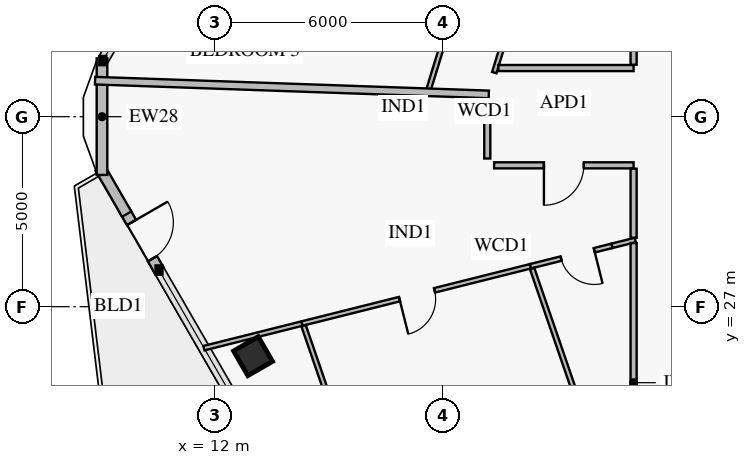
"""IFC4 building model, lengths in metres.
Left out: names, types, materials, properties, quantities, classifications, styles, units other than length and angle.
Written with IfcOpenShell. Run it as: python <this file> out.ifc"""

import sys

from ifc_helpers import new_model, si_unit, direction, frame, frame_2d, origin, origin_2d, place, context, subcontext, project, spatial, rectangle, extrude, element, fill, save


model = new_model("IFC4")
c1 = context("Model", 3, precision=1e-05, world=origin(), true_north=direction((0.0, 1.0)))
c2 = subcontext(c1, "Body", "Model", "MODEL_VIEW")
j1 = project(units=[si_unit("LENGTHUNIT", "METRE"), si_unit("PLANEANGLEUNIT", "RADIAN")], contexts=[c1])
p1 = place(None, origin())
s1 = spatial("IfcSite", under=j1, at=p1, CompositionType="ELEMENT")
p2 = place(p1, origin())
s2 = spatial("IfcBuilding", under=s1, at=p2, CompositionType="ELEMENT")
p3 = place(p2, frame((0.0, 0.0, 342.4)))
s3 = spatial("IfcBuildingStorey", under=s2, at=p3, CompositionType="ELEMENT", Elevation=342.4)
p4 = place(p3, frame((13.007, 25.698, 0.0), z_axis=(0.0, 0.0, 1.0), x_axis=(0.5, -0.866025403784, 0.0)))
e1 = element("IfcColumn", 1, at=p4, inside=s3, PredefinedType="COLUMN", context=c2, shape_type="SweptSolid", body=[
    extrude(rectangle(XDim=0.75, YDim=0.75, at=origin_2d()), origin(), (0.0, 0.0, 1.0), 3.55),
])
p5 = place(p3, frame((10.531, 27.965, 0.0), z_axis=(0.0, 0.0, 1.0), x_axis=(-0.499982180423, 0.866035691677, 0.0)))
e2 = element("IfcWall", 2, at=p5, inside=s3, PredefinedType="SOLIDWALL", context=c2, shape_type="SweptSolid", body=[
    extrude(rectangle(XDim=1.79, YDim=0.28, at=frame_2d((0.895, 0.0))), origin(), (0.0, 0.0, 1.0), 3.55),
])
p6 = place(p5, frame((0.345, 0.0, 0.0)))
e3 = element("IfcOpeningElement", 3, at=p6, cuts=e2, PredefinedType="OPENING", context=c2, shape_type="SweptSolid", body=[
    extrude(rectangle(XDim=1.1, YDim=2.2, at=frame_2d((0.55, 1.1))), frame((0.0, 0.152, 0.0), z_axis=(0.0, -1.0, 0.0), x_axis=(1.0, 0.0, 0.0)), (0.0, 0.0, 1.0), 0.304),
])
p7 = place(p3, frame((9.681, 29.437, 0.0), z_axis=(0.0, 0.0, 1.0), x_axis=(-0.499980071345, 0.866036909293, 0.0)))
e4 = element("IfcWall", 4, at=p7, inside=s3, PredefinedType="SOLIDWALL", context=c2, shape_type="SweptSolid", body=[
    extrude(rectangle(XDim=1.395, YDim=0.28, at=frame_2d((0.697, 0.0))), origin(), (0.0, 0.0, 1.0), 3.122),
])
p8 = place(p3, frame((9.031, 30.468, 0.0), z_axis=(0.0, 0.0, 1.0), x_axis=(0.0, 1.0, 0.0)))
e5 = element("IfcWall", 5, at=p8, inside=s3, PredefinedType="SOLIDWALL", context=c2, shape_type="SweptSolid", body=[
    extrude(rectangle(XDim=3.065, YDim=0.28, at=frame_2d((1.532, 0.0))), origin(), (0.0, 0.0, 1.0), 3.55),
])
p9 = place(p3, frame((21.748, 40.934, 0.0), z_axis=(0.0, 0.0, 1.0), x_axis=(-0.294353697783, -0.955696552574, 0.0)))
e6 = element("IfcWall", 6, at=p9, inside=s3, PredefinedType="PARTITIONING", context=c2, shape_type="SweptSolid", body=[
    extrude(rectangle(XDim=8.134, YDim=0.12, at=frame_2d((4.067, 0.0))), origin(), (0.0, 0.0, 1.0), 3.0),
])
p10 = place(p9, frame((2.246, 0.0, 0.0)))
e7 = element("IfcOpeningElement", 7, at=p10, cuts=e6, PredefinedType="OPENING", context=c2, shape_type="SweptSolid", body=[
    extrude(rectangle(XDim=0.95, YDim=2.1, at=frame_2d((0.475, 1.05))), frame((0.0, 0.072, 0.0), z_axis=(0.0, -1.0, 0.0), x_axis=(1.0, 0.0, 0.0)), (0.0, 0.0, 1.0), 0.144),
])
p11 = place(p9, frame((6.234, 0.0, 0.0)))
e8 = element("IfcOpeningElement", 8, at=p11, cuts=e6, PredefinedType="OPENING", context=c2, shape_type="SweptSolid", body=[
    extrude(rectangle(XDim=0.9, YDim=2.1, at=frame_2d((0.45, 1.05))), frame((0.0, 0.072, 0.0), z_axis=(0.0, -1.0, 0.0), x_axis=(1.0, 0.0, 0.0)), (0.0, 0.0, 1.0), 0.144),
])
p12 = place(p3, frame((20.412, 41.76, 0.0), z_axis=(0.0, 0.0, 1.0), x_axis=(-0.294382698644, -0.955687619853, 0.0)))
e9 = element("IfcWall", 9, at=p12, inside=s3, PredefinedType="PARTITIONING", context=c2, shape_type="SweptSolid", body=[
    extrude(rectangle(XDim=9.478, YDim=0.12, at=frame_2d((4.739, 0.0))), origin(), (0.0, 0.0, 1.0), 3.0),
])
p13 = place(p12, frame((1.187, 0.0, 0.0)))
e10 = element("IfcOpeningElement", 10, at=p13, cuts=e9, PredefinedType="OPENING", context=c2, shape_type="SweptSolid", body=[
    extrude(rectangle(XDim=0.95, YDim=2.1, at=frame_2d((0.475, 1.05))), frame((0.0, 0.072, 0.0), z_axis=(0.0, -1.0, 0.0), x_axis=(1.0, 0.0, 0.0)), (0.0, 0.0, 1.0), 0.144),
])
p14 = place(p12, frame((4.264, 0.0, 0.0)))
e11 = element("IfcOpeningElement", 11, at=p14, cuts=e9, PredefinedType="OPENING", context=c2, shape_type="SweptSolid", body=[
    extrude(rectangle(XDim=0.95, YDim=2.1, at=frame_2d((0.475, 1.05))), frame((0.0, 0.072, 0.0), z_axis=(0.0, -1.0, 0.0), x_axis=(1.0, 0.0, 0.0)), (0.0, 0.0, 1.0), 0.144),
])
p15 = place(p12, frame((7.341, 0.0, 0.0)))
e12 = element("IfcOpeningElement", 12, at=p15, cuts=e9, PredefinedType="OPENING", context=c2, shape_type="SweptSolid", body=[
    extrude(rectangle(XDim=0.95, YDim=2.1, at=frame_2d((0.475, 1.05))), frame((0.0, 0.072, 0.0), z_axis=(0.0, -1.0, 0.0), x_axis=(1.0, 0.0, 0.0)), (0.0, 0.0, 1.0), 0.144),
])
p16 = place(p3, frame((22.45, 28.602, 0.0), z_axis=(0.0, 0.0, 1.0), x_axis=(-0.969941016034, -0.243340143452, 0.0)))
e13 = element("IfcWall", 13, at=p16, inside=s3, PredefinedType="PARTITIONING", context=c2, shape_type="SweptSolid", body=[
    extrude(rectangle(XDim=2.213, YDim=0.12, at=frame_2d((1.106, 0.0))), origin(), (0.0, 0.0, 1.0), 3.55),
])
p17 = place(p16, frame((0.479, 0.0, 0.0)))
e14 = element("IfcOpeningElement", 14, at=p17, cuts=e13, PredefinedType="OPENING", context=c2, shape_type="SweptSolid", body=[
    extrude(rectangle(XDim=0.9, YDim=2.1, at=frame_2d((0.45, 1.05))), frame((0.0, 0.072, 0.0), z_axis=(0.0, -1.0, 0.0), x_axis=(1.0, 0.0, 0.0)), (0.0, 0.0, 1.0), 0.144),
])
p18 = place(p3, frame((20.303, 28.063, 0.0), z_axis=(0.0, 0.0, 1.0), x_axis=(-0.969954547898, -0.243286199796, 0.0)))
e15 = element("IfcWall", 15, at=p18, inside=s3, PredefinedType="PARTITIONING", context=c2, shape_type="SweptSolid", body=[
    extrude(rectangle(XDim=6.199, YDim=0.12, at=frame_2d((3.099, 0.0))), origin(), (0.0, 0.0, 1.0), 3.55),
])
p19 = place(p18, frame((2.599, 0.0, 0.0)))
e16 = element("IfcOpeningElement", 16, at=p19, cuts=e15, PredefinedType="OPENING", context=c2, shape_type="SweptSolid", body=[
    extrude(rectangle(XDim=0.95, YDim=2.1, at=frame_2d((0.475, 1.05))), frame((0.0, 0.072, 0.0), z_axis=(0.0, -1.0, 0.0), x_axis=(1.0, 0.0, 0.0)), (0.0, 0.0, 1.0), 0.144),
])
p20 = place(p3, frame((14.337, 26.497, 0.0), z_axis=(0.0, 0.0, 1.0), x_axis=(0.325570697436, -0.945517699978, 0.0)))
e17 = element("IfcWall", 17, at=p20, inside=s3, PredefinedType="PARTITIONING", context=c2, shape_type="SweptSolid", body=[
    extrude(rectangle(XDim=10.284, YDim=0.12, at=frame_2d((5.142, 0.0))), origin(), (0.0, 0.0, 1.0), 2.97),
])
p21 = place(p20, frame((4.583, 0.0, 0.0)))
e18 = element("IfcOpeningElement", 18, at=p21, cuts=e17, PredefinedType="OPENING", context=c2, shape_type="SweptSolid", body=[
    extrude(rectangle(XDim=0.95, YDim=2.1, at=frame_2d((0.475, 1.05))), frame((0.0, 0.072, 0.0), z_axis=(0.0, -1.0, 0.0), x_axis=(1.0, 0.0, 0.0)), (0.0, 0.0, 1.0), 0.144),
])
p22 = place(p3, frame((19.35, 30.72, 0.0), z_axis=(0.0, 0.0, 1.0), x_axis=(1.0, 0.0, 0.0)))
e19 = element("IfcWall", 19, at=p22, inside=s3, PredefinedType="PARTITIONING", context=c2, shape_type="SweptSolid", body=[
    extrude(rectangle(XDim=3.67, YDim=0.16, at=frame_2d((1.835, 0.0))), origin(), (0.0, 0.0, 1.0), 3.55),
])
p23 = place(p22, frame((1.31, 0.0, 0.0)))
e20 = element("IfcOpeningElement", 20, at=p23, cuts=e19, PredefinedType="OPENING", context=c2, shape_type="SweptSolid", body=[
    extrude(rectangle(XDim=1.05, YDim=2.15, at=frame_2d((0.525, 1.075))), frame((0.0, 0.092, 0.0), z_axis=(0.0, -1.0, 0.0), x_axis=(1.0, 0.0, 0.0)), (0.0, 0.0, 1.0), 0.184),
])
p24 = place(p3, frame((19.21, 32.586, 0.0), z_axis=(0.0, 0.0, 1.0), x_axis=(-0.999390829102, 0.034899437044, 0.0)))
e21 = element("IfcWall", 21, at=p24, inside=s3, PredefinedType="PARTITIONING", context=c2, shape_type="SweptSolid", body=[
    extrude(rectangle(XDim=10.367, YDim=0.2, at=frame_2d((5.184, 0.0))), origin(), (0.0, 0.0, 1.0), 2.97),
])
p25 = place(p3, frame((23.064, 28.756, 0.0), z_axis=(0.0, 0.0, 1.0), x_axis=(-0.969960808965, -0.243261236271, 0.0)))
e22 = element("IfcWall", 22, at=p25, inside=s3, PredefinedType="PARTITIONING", context=c2, shape_type="SweptSolid", body=[
    extrude(rectangle(XDim=0.633, YDim=0.12, at=frame_2d((0.317, 0.0))), origin(), (0.0, 0.0, 1.0), 3.55),
])
p26 = place(p3, frame((14.291, 26.555, 0.0), z_axis=(0.0, 0.0, 1.0), x_axis=(-0.969963851094, -0.243249106002, 0.0)))
e23 = element("IfcWall", 23, at=p26, inside=s3, PredefinedType="PARTITIONING", context=c2, shape_type="SweptSolid", body=[
    extrude(rectangle(XDim=2.657, YDim=0.12, at=frame_2d((1.328, 0.0))), origin(), (0.0, 0.0, 1.0), 2.97),
])
p27 = place(p3, frame((20.35, 28.005, 0.0), z_axis=(0.0, 0.0, 1.0), x_axis=(0.32554082169, -0.945527986584, 0.0)))
e24 = element("IfcWall", 24, at=p27, inside=s3, PredefinedType="PARTITIONING", context=c2, shape_type="SweptSolid", body=[
    extrude(rectangle(XDim=7.443, YDim=0.12, at=frame_2d((3.722, 0.0))), origin(), (0.0, 0.0, 1.0), 3.0),
])
p28 = place(p3, frame((23.02, 33.28, 0.0), z_axis=(0.0, 0.0, 1.0), x_axis=(-1.0, 0.0, 0.0)))
e25 = element("IfcWall", 25, at=p28, inside=s3, PredefinedType="PARTITIONING", context=c2, shape_type="SweptSolid", body=[
    extrude(rectangle(XDim=3.559, YDim=0.16, at=frame_2d((1.779, 0.0))), origin(), (0.0, 0.0, 1.0), 3.55),
])
p29 = place(p3, frame((23.02, 35.073, 0.0), z_axis=(0.0, 0.0, 1.0), x_axis=(0.0, -1.0, 0.0)))
e26 = element("IfcWall", 26, at=p29, inside=s3, PredefinedType="PARTITIONING", context=c2, shape_type="SweptSolid", body=[
    extrude(rectangle(XDim=1.705, YDim=0.16, at=frame_2d((0.853, 0.0))), origin(), (0.0, 0.0, 1.0), 3.55),
])
p30 = place(p3, frame((23.02, 30.632, 0.0), z_axis=(0.0, 0.0, 1.0), x_axis=(0.0, -1.0, 0.0)))
e27 = element("IfcWall", 27, at=p30, inside=s3, PredefinedType="PARTITIONING", context=c2, shape_type="SweptSolid", body=[
    extrude(rectangle(XDim=1.817, YDim=0.16, at=frame_2d((0.909, 0.0))), origin(), (0.0, 0.0, 1.0), 3.55),
])
p31 = place(p3, frame((19.17, 32.421, 0.0), z_axis=(0.0, 0.0, 1.0), x_axis=(0.0, -1.0, 0.0)))
e28 = element("IfcWall", 28, at=p31, inside=s3, PredefinedType="PARTITIONING", context=c2, shape_type="SweptSolid", body=[
    extrude(rectangle(XDim=1.521, YDim=0.16, at=frame_2d((0.76, 0.0))), origin(), (0.0, 0.0, 1.0), 3.55),
])
p32 = place(p3, frame((23.02, 28.674, 0.0), z_axis=(0.0, 0.0, 1.0), x_axis=(0.0, -1.0, 0.0)))
e29 = element("IfcWall", 29, at=p32, inside=s3, PredefinedType="PARTITIONING", context=c2, shape_type="SweptSolid", body=[
    extrude(rectangle(XDim=7.348, YDim=0.16, at=frame_2d((3.674, 0.0))), origin(), (0.0, 0.0, 1.0), 3.0),
])
p33 = place(p6, frame((1.1, 0.0, 0.0), z_axis=(0.0, 0.0, 1.0), x_axis=(-1.0, 0.0, 0.0)))
e30 = element("IfcDoor", 30, at=p33, inside=s3, OperationType="SINGLE_SWING_LEFT", PredefinedType="DOOR", context=c2, shape_type="SweptSolid", body=[
    extrude(rectangle(XDim=1.1, YDim=2.2, at=frame_2d((0.55, 1.1))), frame((0.0, 0.025, 0.0), z_axis=(0.0, -1.0, 0.0), x_axis=(1.0, 0.0, 0.0)), (0.0, 0.0, 1.0), 0.05),
])
fill(e3, e30)
p34 = place(p17, origin())
e31 = element("IfcDoor", 31, at=p34, inside=s3, OperationType="SINGLE_SWING_LEFT", PredefinedType="DOOR", context=c2, shape_type="SweptSolid", body=[
    extrude(rectangle(XDim=0.9, YDim=2.1, at=frame_2d((0.45, 1.05))), frame((0.0, 0.025, 0.0), z_axis=(0.0, -1.0, 0.0), x_axis=(1.0, 0.0, 0.0)), (0.0, 0.0, 1.0), 0.05),
])
fill(e14, e31)
p35 = place(p19, origin())
e32 = element("IfcDoor", 32, at=p35, inside=s3, OperationType="SINGLE_SWING_RIGHT", PredefinedType="DOOR", context=c2, shape_type="SweptSolid", body=[
    extrude(rectangle(XDim=0.95, YDim=2.1, at=frame_2d((0.475, 1.05))), frame((0.0, 0.025, 0.0), z_axis=(0.0, -1.0, 0.0), x_axis=(1.0, 0.0, 0.0)), (0.0, 0.0, 1.0), 0.05),
])
fill(e16, e32)
p36 = place(p23, frame((1.05, 0.0, 0.0), z_axis=(0.0, 0.0, 1.0), x_axis=(-1.0, 0.0, 0.0)))
e33 = element("IfcDoor", 33, at=p36, inside=s3, OperationType="SINGLE_SWING_RIGHT", PredefinedType="DOOR", context=c2, shape_type="SweptSolid", body=[
    extrude(rectangle(XDim=1.05, YDim=2.15, at=frame_2d((0.525, 1.075))), frame((0.0, 0.025, 0.0), z_axis=(0.0, -1.0, 0.0), x_axis=(1.0, 0.0, 0.0)), (0.0, 0.0, 1.0), 0.05),
])
fill(e20, e33)
save(model, sys.argv[1])
